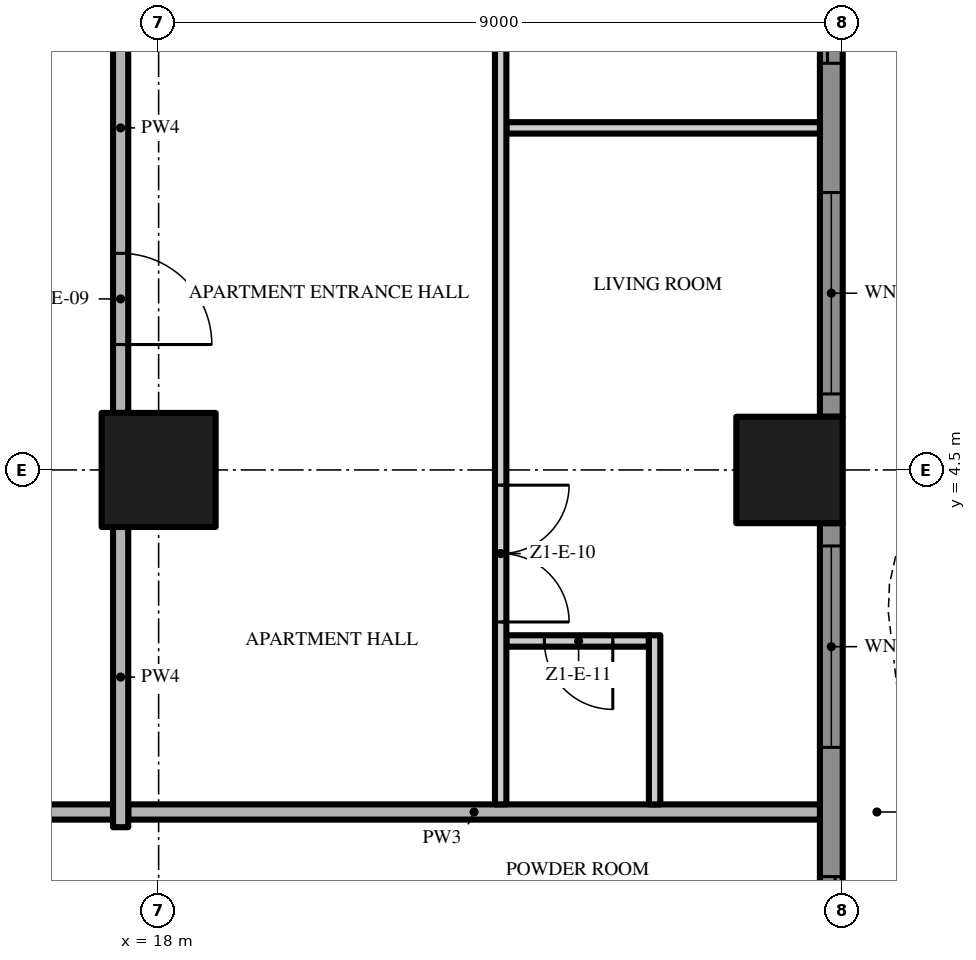
"""IFC4 building model, lengths in metres.
Left out: names, types, materials, properties, quantities, classifications, styles, units other than length and angle.
Written with IfcOpenShell. Run it as: python <this file> out.ifc"""

import sys

from ifc_helpers import new_model, si_unit, direction, frame, frame_2d, origin, origin_2d, place, context, subcontext, project, spatial, polyline, rectangle, outline, extrude, element, fill, save


model = new_model("IFC4")
c1 = context("Model", 3, precision=1e-05, world=origin(), true_north=direction((0.0, 1.0)))
c2 = subcontext(c1, "Body", "Model", "MODEL_VIEW")
j1 = project(units=[si_unit("LENGTHUNIT", "METRE"), si_unit("PLANEANGLEUNIT", "RADIAN")], contexts=[c1])
p1 = place(None, origin())
s1 = spatial("IfcSite", under=j1, at=p1, CompositionType="ELEMENT")
p2 = place(p1, origin())
s2 = spatial("IfcBuilding", under=s1, at=p2, CompositionType="ELEMENT")
p3 = place(p2, frame((0.0, 0.0, 56.8)))
s3 = spatial("IfcBuildingStorey", under=s2, at=p3, CompositionType="ELEMENT", Elevation=56.8)
p4 = place(p3, frame((18.0, 4.5, 0.0), z_axis=(0.0, 0.0, 1.0), x_axis=(1.0, 0.0, 0.0)))
e1 = element("IfcColumn", 1, at=p4, inside=s3, PredefinedType="COLUMN", context=c2, shape_type="SweptSolid", body=[
    extrude(rectangle(XDim=1.5, YDim=1.5, at=origin_2d()), origin(), (0.0, 0.0, 1.0), 3.5),
])
p5 = place(p3, frame((26.3, 4.5, 0.0), z_axis=(0.0, 0.0, 1.0), x_axis=(1.0, 0.0, 0.0)))
e2 = element("IfcColumn", 2, at=p5, inside=s3, PredefinedType="COLUMN", context=c2, shape_type="SweptSolid", body=[
    extrude(rectangle(XDim=1.4, YDim=1.4, at=origin_2d()), origin(), (0.0, 0.0, 1.0), 3.5),
])
p6 = place(p3, frame((26.85, 3.8, 0.0), z_axis=(0.0, 0.0, 1.0), x_axis=(0.0, -1.0, 0.0)))
e3 = element("IfcWall", 3, at=p6, inside=s3, PredefinedType="SOLIDWALL", context=c2, shape_type="SweptSolid", body=[
    extrude(rectangle(XDim=7.6, YDim=0.3, at=frame_2d((3.8, 0.0))), origin(), (0.0, 0.0, 1.0), 3.5),
])
p7 = place(p6, frame((4.65, 0.0, 0.0)))
e4 = element("IfcOpeningElement", 4, at=p7, cuts=e3, PredefinedType="OPENING", context=c2, shape_type="SweptSolid", body=[
    extrude(rectangle(XDim=2.65, YDim=2.4, at=frame_2d((1.325, 1.2))), frame((0.0, 0.16, 0.0), z_axis=(0.0, -1.0, 0.0), x_axis=(1.0, 0.0, 0.0)), (0.0, 0.0, 1.0), 0.32),
])
p8 = place(p6, frame((0.3, 0.0, 0.45)))
e5 = element("IfcOpeningElement", 5, at=p8, cuts=e3, PredefinedType="OPENING", context=c2, shape_type="SweptSolid", body=[
    extrude(rectangle(XDim=2.65, YDim=2.65, at=frame_2d((1.325, 1.325))), frame((0.0, 0.16, 0.0), z_axis=(0.0, -1.0, 0.0), x_axis=(1.0, 0.0, 0.0)), (0.0, 0.0, 1.0), 0.32),
])
p9 = place(p3, frame((26.85, 12.8, 0.0), z_axis=(0.0, 0.0, 1.0), x_axis=(0.0, -1.0, 0.0)))
e6 = element("IfcWall", 6, at=p9, inside=s3, PredefinedType="SOLIDWALL", context=c2, shape_type="SweptSolid", body=[
    extrude(rectangle(XDim=7.6, YDim=0.3, at=frame_2d((3.8, 0.0))), origin(), (0.0, 0.0, 1.0), 3.5),
])
p10 = place(p9, frame((4.65, 0.0, 0.45)))
e7 = element("IfcOpeningElement", 7, at=p10, cuts=e6, PredefinedType="OPENING", context=c2, shape_type="SweptSolid", body=[
    extrude(rectangle(XDim=2.65, YDim=2.65, at=frame_2d((1.325, 1.325))), frame((0.0, 0.16, 0.0), z_axis=(0.0, -1.0, 0.0), x_axis=(1.0, 0.0, 0.0)), (0.0, 0.0, 1.0), 0.32),
])
p11 = place(p9, frame((0.3, 0.0, 0.0)))
e8 = element("IfcOpeningElement", 8, at=p11, cuts=e6, PredefinedType="OPENING", context=c2, shape_type="SweptSolid", body=[
    extrude(rectangle(XDim=2.65, YDim=2.4, at=frame_2d((1.325, 1.2))), frame((0.0, 0.16, 0.0), z_axis=(0.0, -1.0, 0.0), x_axis=(1.0, 0.0, 0.0)), (0.0, 0.0, 1.0), 0.32),
])
p12 = place(p3, origin())
e9 = element("IfcWall", 9, at=p12, inside=s3, PredefinedType="USERDEFINED", context=c2, shape_type="SweptSolid", body=[
    extrude(outline(polyline([(29.649, -18.0), (28.988, -16.5), (28.255, -15.0), (27.731, -13.5), (27.6, -12.375), (27.615, -12.0), (27.951, -10.5), (28.612, -9.0), (29.345, -7.5), (29.869, -6.0), (30.0, -4.875), (29.985, -4.5), (29.649, -3.0), (28.988, -1.5), (28.255, 0.0), (27.731, 1.5), (27.6, 2.625), (27.615, 3.0), (27.951, 4.5), (28.612, 6.0), (29.345, 7.5), (29.869, 9.0), (30.0, 10.125), (29.985, 10.5), (29.649, 12.0), (28.988, 13.5), (28.255, 15.0), (27.731, 16.5), (27.6, 17.625), (27.615, 18.0), (27.365, 18.01), (27.349, 17.615), (27.486, 16.444), (28.024, 14.904), (28.761, 13.395), (29.41, 11.921), (29.736, 10.467), (29.749, 10.135), (29.624, 9.056), (29.114, 7.596), (28.385, 6.105), (27.713, 4.579), (27.366, 3.033), (27.349, 2.615), (27.486, 1.444), (28.024, -0.096), (28.761, -1.605), (29.41, -3.079), (29.736, -4.533), (29.749, -4.865), (29.624, -5.944), (29.114, -7.404), (28.385, -8.895), (27.713, -10.421), (27.366, -11.967), (27.349, -12.385), (27.486, -13.556), (28.024, -15.096), (28.761, -16.605), (29.42, -18.101), (29.649, -18.0)])), origin(), (0.0, 0.0, 1.0), 0.9),
])
p13 = place(p3, frame((17.4, 0.0, 0.0), z_axis=(0.0, 0.0, 1.0), x_axis=(-1.0, 0.0, 0.0)))
e10 = element("IfcWall", 10, at=p13, inside=s3, PredefinedType="PARTITIONING", context=c2, shape_type="SweptSolid", body=[
    extrude(rectangle(XDim=17.3, YDim=0.2, at=frame_2d((8.65, 0.0))), origin(), (0.0, 0.0, 1.0), 3.5),
])
p14 = place(p13, frame((7.65, 0.0, 0.0)))
e11 = element("IfcOpeningElement", 11, at=p14, cuts=e10, PredefinedType="OPENING", context=c2, shape_type="SweptSolid", body=[
    extrude(rectangle(XDim=1.5, YDim=2.4, at=frame_2d((0.75, 1.2))), frame((0.0, 0.11, 0.0), z_axis=(0.0, -1.0, 0.0), x_axis=(1.0, 0.0, 0.0)), (0.0, 0.0, 1.0), 0.22),
])
p15 = place(p3, frame((17.6, 0.0, 0.0), z_axis=(0.0, 0.0, 1.0), x_axis=(1.0, 0.0, 0.0)))
e12 = element("IfcWall", 12, at=p15, inside=s3, PredefinedType="PARTITIONING", context=c2, shape_type="SweptSolid", body=[
    extrude(rectangle(XDim=9.1, YDim=0.2, at=frame_2d((4.55, 0.0))), origin(), (0.0, 0.0, 1.0), 3.5),
])
p16 = place(p3, frame((24.45, 2.25, 0.0), z_axis=(0.0, 0.0, 1.0), x_axis=(-1.0, 0.0, 0.0)))
e13 = element("IfcWall", 13, at=p16, inside=s3, PredefinedType="PARTITIONING", context=c2, shape_type="SweptSolid", body=[
    extrude(rectangle(XDim=1.875, YDim=0.15, at=frame_2d((0.938, 0.0))), origin(), (0.0, 0.0, 1.0), 3.5),
])
p17 = place(p16, frame((0.475, 0.0, 0.0)))
e14 = element("IfcOpeningElement", 14, at=p17, cuts=e13, PredefinedType="OPENING", context=c2, shape_type="SweptSolid", body=[
    extrude(rectangle(XDim=0.9, YDim=2.1, at=frame_2d((0.45, 1.05))), frame((0.0, 0.085, 0.0), z_axis=(0.0, -1.0, 0.0), x_axis=(1.0, 0.0, 0.0)), (0.0, 0.0, 1.0), 0.17),
])
p18 = place(p3, frame((22.575, 9.0, 0.0), z_axis=(0.0, 0.0, 1.0), x_axis=(1.0, 0.0, 0.0)))
e15 = element("IfcWall", 15, at=p18, inside=s3, PredefinedType="PARTITIONING", context=c2, shape_type="SweptSolid", body=[
    extrude(rectangle(XDim=4.125, YDim=0.15, at=frame_2d((2.062, 0.0))), origin(), (0.0, 0.0, 1.0), 3.5),
])
p19 = place(p3, frame((17.5, -0.2, 0.0), z_axis=(0.0, 0.0, 1.0), x_axis=(0.0, 1.0, 0.0)))
e16 = element("IfcWall", 16, at=p19, inside=s3, PredefinedType="PARTITIONING", context=c2, shape_type="SweptSolid", body=[
    extrude(rectangle(XDim=3.95, YDim=0.2, at=frame_2d((1.975, 0.0))), origin(), (0.0, 0.0, 1.0), 3.5),
])
p20 = place(p3, frame((17.5, 12.75, 0.0), z_axis=(0.0, 0.0, 1.0), x_axis=(0.0, -1.0, 0.0)))
e17 = element("IfcWall", 17, at=p20, inside=s3, PredefinedType="PARTITIONING", context=c2, shape_type="SweptSolid", body=[
    extrude(rectangle(XDim=7.5, YDim=0.2, at=frame_2d((3.75, 0.0))), origin(), (0.0, 0.0, 1.0), 3.5),
])
p21 = place(p20, frame((5.4, 0.0, 0.0)))
e18 = element("IfcOpeningElement", 18, at=p21, cuts=e17, PredefinedType="OPENING", context=c2, shape_type="SweptSolid", body=[
    extrude(rectangle(XDim=1.2, YDim=2.4, at=frame_2d((0.6, 1.2))), frame((0.0, 0.11, 0.0), z_axis=(0.0, -1.0, 0.0), x_axis=(1.0, 0.0, 0.0)), (0.0, 0.0, 1.0), 0.22),
])
p22 = place(p3, frame((22.5, 17.3, 0.0), z_axis=(0.0, 0.0, 1.0), x_axis=(0.0, -1.0, 0.0)))
e19 = element("IfcWall", 19, at=p22, inside=s3, PredefinedType="PARTITIONING", context=c2, shape_type="SweptSolid", body=[
    extrude(rectangle(XDim=17.2, YDim=0.15, at=frame_2d((8.6, 0.0))), origin(), (0.0, 0.0, 1.0), 3.5),
])
p23 = place(p22, frame((13.0, 0.0, 0.0)))
e20 = element("IfcOpeningElement", 20, at=p23, cuts=e19, PredefinedType="OPENING", context=c2, shape_type="SweptSolid", body=[
    extrude(rectangle(XDim=1.8, YDim=2.4, at=frame_2d((0.9, 1.2))), frame((0.0, 0.085, 0.0), z_axis=(0.0, -1.0, 0.0), x_axis=(1.0, 0.0, 0.0)), (0.0, 0.0, 1.0), 0.17),
])
p24 = place(p22, frame((5.55, 0.0, 0.0)))
e21 = element("IfcOpeningElement", 21, at=p24, cuts=e19, PredefinedType="OPENING", context=c2, shape_type="SweptSolid", body=[
    extrude(rectangle(XDim=1.0, YDim=2.4, at=frame_2d((0.5, 1.2))), frame((0.0, 0.085, 0.0), z_axis=(0.0, -1.0, 0.0), x_axis=(1.0, 0.0, 0.0)), (0.0, 0.0, 1.0), 0.17),
])
p25 = place(p22, frame((0.15, 0.0, 0.0)))
e22 = element("IfcOpeningElement", 22, at=p25, cuts=e19, PredefinedType="OPENING", context=c2, shape_type="SweptSolid", body=[
    extrude(rectangle(XDim=1.0, YDim=2.4, at=frame_2d((0.5, 1.2))), frame((0.0, 0.085, 0.0), z_axis=(0.0, -1.0, 0.0), x_axis=(1.0, 0.0, 0.0)), (0.0, 0.0, 1.0), 0.17),
])
p26 = place(p3, frame((24.525, 0.1, 0.0), z_axis=(0.0, 0.0, 1.0), x_axis=(0.0, 1.0, 0.0)))
e23 = element("IfcWall", 23, at=p26, inside=s3, PredefinedType="PARTITIONING", context=c2, shape_type="SweptSolid", body=[
    extrude(rectangle(XDim=2.225, YDim=0.15, at=frame_2d((1.113, 0.0))), origin(), (0.0, 0.0, 1.0), 3.5),
])
p27 = place(p7, origin())
e24 = element("IfcDoor", 24, at=p27, inside=s3, OperationType="SINGLE_SWING_LEFT", PredefinedType="DOOR", context=c2, shape_type="SweptSolid", body=[
    extrude(rectangle(XDim=2.65, YDim=2.4, at=frame_2d((1.325, 1.2))), frame((0.0, 0.025, 0.0), z_axis=(0.0, -1.0, 0.0), x_axis=(1.0, 0.0, 0.0)), (0.0, 0.0, 1.0), 0.05),
])
fill(e4, e24)
p28 = place(p8, origin())
e25 = element("IfcWindow", 25, at=p28, inside=s3, PartitioningType="SINGLE_PANEL", PredefinedType="WINDOW", context=c2, shape_type="SweptSolid", body=[
    extrude(rectangle(XDim=2.65, YDim=2.65, at=frame_2d((1.325, 1.325))), frame((0.0, 0.03, 0.0), z_axis=(0.0, -1.0, 0.0), x_axis=(1.0, 0.0, 0.0)), (0.0, 0.0, 1.0), 0.06),
])
fill(e5, e25)
p29 = place(p10, origin())
e26 = element("IfcWindow", 26, at=p29, inside=s3, PartitioningType="SINGLE_PANEL", PredefinedType="WINDOW", context=c2, shape_type="SweptSolid", body=[
    extrude(rectangle(XDim=2.65, YDim=2.65, at=frame_2d((1.325, 1.325))), frame((0.0, 0.03, 0.0), z_axis=(0.0, -1.0, 0.0), x_axis=(1.0, 0.0, 0.0)), (0.0, 0.0, 1.0), 0.06),
])
fill(e7, e26)
p30 = place(p11, origin())
e27 = element("IfcDoor", 27, at=p30, inside=s3, OperationType="SINGLE_SWING_LEFT", PredefinedType="DOOR", context=c2, shape_type="SweptSolid", body=[
    extrude(rectangle(XDim=2.65, YDim=2.4, at=frame_2d((1.325, 1.2))), frame((0.0, 0.025, 0.0), z_axis=(0.0, -1.0, 0.0), x_axis=(1.0, 0.0, 0.0)), (0.0, 0.0, 1.0), 0.05),
])
fill(e8, e27)
p31 = place(p21, origin())
e28 = element("IfcDoor", 28, at=p31, inside=s3, OperationType="SINGLE_SWING_RIGHT", PredefinedType="DOOR", context=c2, shape_type="SweptSolid", body=[
    extrude(rectangle(XDim=1.2, YDim=2.4, at=frame_2d((0.6, 1.2))), frame((0.0, 0.025, 0.0), z_axis=(0.0, -1.0, 0.0), x_axis=(1.0, 0.0, 0.0)), (0.0, 0.0, 1.0), 0.05),
])
fill(e18, e28)
p32 = place(p23, origin())
e29 = element("IfcDoor", 29, at=p32, inside=s3, OperationType="DOUBLE_DOOR_SINGLE_SWING", PredefinedType="DOOR", context=c2, shape_type="SweptSolid", body=[
    extrude(rectangle(XDim=1.8, YDim=2.4, at=frame_2d((0.9, 1.2))), frame((0.0, 0.025, 0.0), z_axis=(0.0, -1.0, 0.0), x_axis=(1.0, 0.0, 0.0)), (0.0, 0.0, 1.0), 0.05),
])
fill(e20, e29)
p33 = place(p17, origin())
e30 = element("IfcDoor", 30, at=p33, inside=s3, OperationType="SINGLE_SWING_LEFT", PredefinedType="DOOR", context=c2, shape_type="SweptSolid", body=[
    extrude(rectangle(XDim=0.9, YDim=2.1, at=frame_2d((0.45, 1.05))), frame((0.0, 0.025, 0.0), z_axis=(0.0, -1.0, 0.0), x_axis=(1.0, 0.0, 0.0)), (0.0, 0.0, 1.0), 0.05),
])
fill(e14, e30)
save(model, sys.argv[1])
